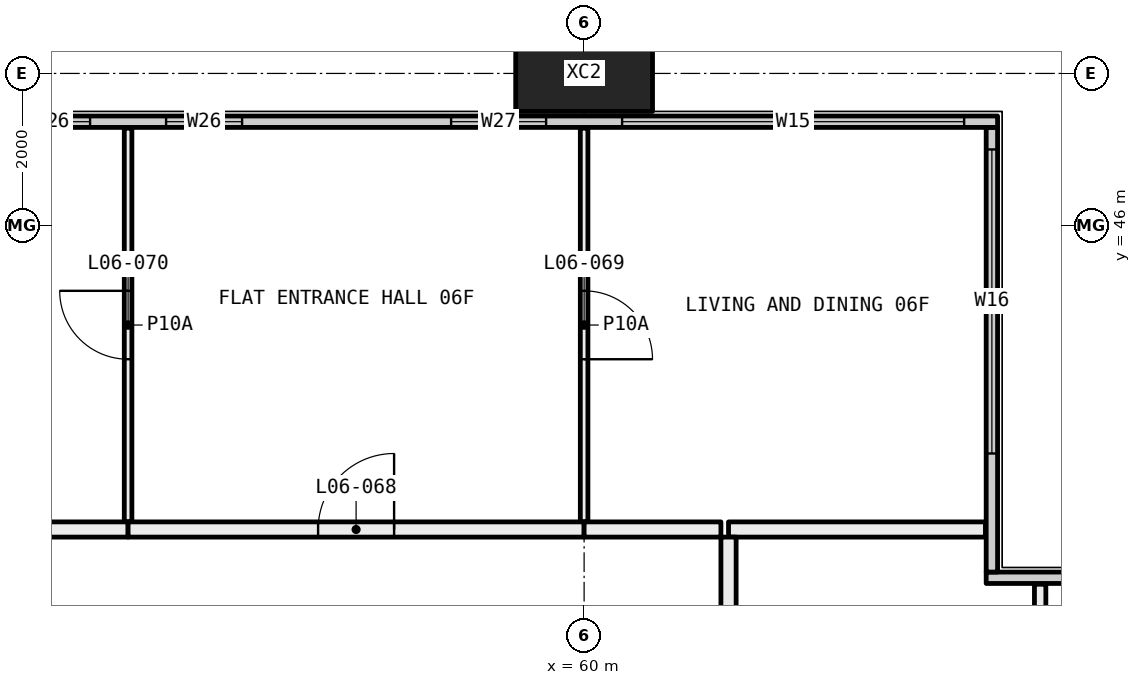
"""IFC4 building model, lengths in metres.
Left out: names, types, materials, properties, quantities, classifications, styles, units other than length and angle.
Written with IfcOpenShell. Run it as: python <this file> out.ifc"""

import sys

from ifc_helpers import new_model, si_unit, direction, frame, frame_2d, origin, origin_2d, place, context, subcontext, project, spatial, rectangle, hollow_rectangle, extrude, element, fill, save


model = new_model("IFC4")
c1 = context("Model", 3, precision=1e-05, world=origin(), true_north=direction((0.0, 1.0)))
c2 = subcontext(c1, "Body", "Model", "MODEL_VIEW")
j1 = project(units=[si_unit("LENGTHUNIT", "METRE"), si_unit("PLANEANGLEUNIT", "RADIAN")], contexts=[c1])
p1 = place(None, origin())
s1 = spatial("IfcSite", under=j1, at=p1, CompositionType="ELEMENT")
p2 = place(p1, origin())
s2 = spatial("IfcBuilding", under=s1, at=p2, CompositionType="ELEMENT")
p3 = place(p2, frame((0.0, 0.0, 33.45)))
s3 = spatial("IfcBuildingStorey", under=s2, at=p3, CompositionType="ELEMENT", Elevation=33.45)
p4 = place(p3, frame((60.0, 48.0, -0.4), z_axis=(0.0, 0.0, 1.0), x_axis=(1.0, 0.0, 0.0)))
e1 = element("IfcColumn", 1, at=p4, inside=s3, PredefinedType="COLUMN", context=c2, shape_type="SweptSolid", body=[
    extrude(hollow_rectangle(XDim=1.8, YDim=1.0, WallThickness=0.07, at=origin_2d()), origin(), (0.0, 0.0, 1.0), 3.45),
])
p5 = place(p3, frame((65.29, 41.365, 0.0), z_axis=(0.0, 0.0, 1.0), x_axis=(1.0, 0.0, 0.0)))
e2 = element("IfcWall", 2, at=p5, inside=s3, PredefinedType="ELEMENTEDWALL", context=c2, shape_type="SweptSolid", body=[
    extrude(rectangle(XDim=6.15, YDim=0.15, at=frame_2d((3.075, 0.0))), origin(), (0.0, 0.0, 1.0), 3.05),
])
p6 = place(p5, frame((1.71, 0.0, 0.45)))
e3 = element("IfcOpeningElement", 3, at=p6, cuts=e2, PredefinedType="OPENING", context=c2, shape_type="SweptSolid", body=[
    extrude(rectangle(XDim=4.0, YDim=2.55, at=frame_2d((2.0, 1.275))), frame((0.0, 0.085, 0.0), z_axis=(0.0, -1.0, 0.0), x_axis=(1.0, 0.0, 0.0)), (0.0, 0.0, 1.0), 0.17),
])
p7 = place(p3, frame((65.365, 41.44, 0.0), z_axis=(0.0, 0.0, 1.0), x_axis=(0.0, 1.0, 0.0)))
e4 = element("IfcWall", 4, at=p7, inside=s3, PredefinedType="ELEMENTEDWALL", context=c2, shape_type="SweptSolid", body=[
    extrude(rectangle(XDim=5.85, YDim=0.15, at=frame_2d((2.925, 0.0))), origin(), (0.0, 0.0, 1.0), 3.05),
])
p8 = place(p7, frame((1.56, 0.0, 0.45)))
e5 = element("IfcOpeningElement", 5, at=p8, cuts=e4, PredefinedType="OPENING", context=c2, shape_type="SweptSolid", body=[
    extrude(rectangle(XDim=4.0, YDim=2.55, at=frame_2d((2.0, 1.275))), frame((0.0, 0.085, 0.0), z_axis=(0.0, -1.0, 0.0), x_axis=(1.0, 0.0, 0.0)), (0.0, 0.0, 1.0), 0.17),
])
p9 = place(p3, frame((6.56, 47.365, 0.0), z_axis=(0.0, 0.0, 1.0), x_axis=(1.0, 0.0, 0.0)))
e6 = element("IfcWall", 6, at=p9, inside=s3, PredefinedType="ELEMENTEDWALL", context=c2, shape_type="SweptSolid", body=[
    extrude(rectangle(XDim=58.88, YDim=0.15, at=frame_2d((29.44, 0.0))), origin(), (0.0, 0.0, 1.0), 3.05),
])
p10 = place(p9, frame((0.44, 0.0, 0.45)))
e7 = element("IfcOpeningElement", 7, at=p10, cuts=e6, PredefinedType="OPENING", context=c2, shape_type="SweptSolid", body=[
    extrude(rectangle(XDim=4.5, YDim=2.55, at=frame_2d((2.25, 1.275))), frame((0.0, 0.085, 0.0), z_axis=(0.0, -1.0, 0.0), x_axis=(1.0, 0.0, 0.0)), (0.0, 0.0, 1.0), 0.17),
])
p11 = place(p9, frame((5.94, 0.0, 0.45)))
e8 = element("IfcOpeningElement", 8, at=p11, cuts=e6, PredefinedType="OPENING", context=c2, shape_type="SweptSolid", body=[
    extrude(rectangle(XDim=1.25, YDim=2.55, at=frame_2d((0.625, 1.275))), frame((0.0, 0.085, 0.0), z_axis=(0.0, -1.0, 0.0), x_axis=(1.0, 0.0, 0.0)), (0.0, 0.0, 1.0), 0.17),
])
p12 = place(p9, frame((9.94, 0.0, 0.45)))
e9 = element("IfcOpeningElement", 9, at=p12, cuts=e6, PredefinedType="OPENING", context=c2, shape_type="SweptSolid", body=[
    extrude(rectangle(XDim=1.0, YDim=2.55, at=frame_2d((0.5, 1.275))), frame((0.0, 0.085, 0.0), z_axis=(0.0, -1.0, 0.0), x_axis=(1.0, 0.0, 0.0)), (0.0, 0.0, 1.0), 0.17),
])
p13 = place(p9, frame((11.94, 0.0, 0.45)))
e10 = element("IfcOpeningElement", 10, at=p13, cuts=e6, PredefinedType="OPENING", context=c2, shape_type="SweptSolid", body=[
    extrude(rectangle(XDim=1.0, YDim=2.55, at=frame_2d((0.5, 1.275))), frame((0.0, 0.085, 0.0), z_axis=(0.0, -1.0, 0.0), x_axis=(1.0, 0.0, 0.0)), (0.0, 0.0, 1.0), 0.17),
])
p14 = place(p9, frame((15.69, 0.0, 0.45)))
e11 = element("IfcOpeningElement", 11, at=p14, cuts=e6, PredefinedType="OPENING", context=c2, shape_type="SweptSolid", body=[
    extrude(rectangle(XDim=1.25, YDim=2.55, at=frame_2d((0.625, 1.275))), frame((0.0, 0.085, 0.0), z_axis=(0.0, -1.0, 0.0), x_axis=(1.0, 0.0, 0.0)), (0.0, 0.0, 1.0), 0.17),
])
p15 = place(p9, frame((17.94, 0.0, 0.45)))
e12 = element("IfcOpeningElement", 12, at=p15, cuts=e6, PredefinedType="OPENING", context=c2, shape_type="SweptSolid", body=[
    extrude(rectangle(XDim=1.25, YDim=2.55, at=frame_2d((0.625, 1.275))), frame((0.0, 0.085, 0.0), z_axis=(0.0, -1.0, 0.0), x_axis=(1.0, 0.0, 0.0)), (0.0, 0.0, 1.0), 0.17),
])
p16 = place(p9, frame((21.94, 0.0, 0.45)))
e13 = element("IfcOpeningElement", 13, at=p16, cuts=e6, PredefinedType="OPENING", context=c2, shape_type="SweptSolid", body=[
    extrude(rectangle(XDim=1.0, YDim=2.55, at=frame_2d((0.5, 1.275))), frame((0.0, 0.085, 0.0), z_axis=(0.0, -1.0, 0.0), x_axis=(1.0, 0.0, 0.0)), (0.0, 0.0, 1.0), 0.17),
])
p17 = place(p9, frame((23.94, 0.0, 0.45)))
e14 = element("IfcOpeningElement", 14, at=p17, cuts=e6, PredefinedType="OPENING", context=c2, shape_type="SweptSolid", body=[
    extrude(rectangle(XDim=1.0, YDim=2.55, at=frame_2d((0.5, 1.275))), frame((0.0, 0.085, 0.0), z_axis=(0.0, -1.0, 0.0), x_axis=(1.0, 0.0, 0.0)), (0.0, 0.0, 1.0), 0.17),
])
p18 = place(p9, frame((27.69, 0.0, 0.45)))
e15 = element("IfcOpeningElement", 15, at=p18, cuts=e6, PredefinedType="OPENING", context=c2, shape_type="SweptSolid", body=[
    extrude(rectangle(XDim=1.25, YDim=2.55, at=frame_2d((0.625, 1.275))), frame((0.0, 0.085, 0.0), z_axis=(0.0, -1.0, 0.0), x_axis=(1.0, 0.0, 0.0)), (0.0, 0.0, 1.0), 0.17),
])
p19 = place(p9, frame((29.94, 0.0, 0.45)))
e16 = element("IfcOpeningElement", 16, at=p19, cuts=e6, PredefinedType="OPENING", context=c2, shape_type="SweptSolid", body=[
    extrude(rectangle(XDim=1.25, YDim=2.55, at=frame_2d((0.625, 1.275))), frame((0.0, 0.085, 0.0), z_axis=(0.0, -1.0, 0.0), x_axis=(1.0, 0.0, 0.0)), (0.0, 0.0, 1.0), 0.17),
])
p20 = place(p9, frame((33.94, 0.0, 0.45)))
e17 = element("IfcOpeningElement", 17, at=p20, cuts=e6, PredefinedType="OPENING", context=c2, shape_type="SweptSolid", body=[
    extrude(rectangle(XDim=1.0, YDim=2.55, at=frame_2d((0.5, 1.275))), frame((0.0, 0.085, 0.0), z_axis=(0.0, -1.0, 0.0), x_axis=(1.0, 0.0, 0.0)), (0.0, 0.0, 1.0), 0.17),
])
p21 = place(p9, frame((35.94, 0.0, 0.45)))
e18 = element("IfcOpeningElement", 18, at=p21, cuts=e6, PredefinedType="OPENING", context=c2, shape_type="SweptSolid", body=[
    extrude(rectangle(XDim=1.0, YDim=2.55, at=frame_2d((0.5, 1.275))), frame((0.0, 0.085, 0.0), z_axis=(0.0, -1.0, 0.0), x_axis=(1.0, 0.0, 0.0)), (0.0, 0.0, 1.0), 0.17),
])
p22 = place(p9, frame((39.69, 0.0, 0.45)))
e19 = element("IfcOpeningElement", 19, at=p22, cuts=e6, PredefinedType="OPENING", context=c2, shape_type="SweptSolid", body=[
    extrude(rectangle(XDim=1.25, YDim=2.55, at=frame_2d((0.625, 1.275))), frame((0.0, 0.085, 0.0), z_axis=(0.0, -1.0, 0.0), x_axis=(1.0, 0.0, 0.0)), (0.0, 0.0, 1.0), 0.17),
])
p23 = place(p9, frame((41.94, 0.0, 0.45)))
e20 = element("IfcOpeningElement", 20, at=p23, cuts=e6, PredefinedType="OPENING", context=c2, shape_type="SweptSolid", body=[
    extrude(rectangle(XDim=1.25, YDim=2.55, at=frame_2d((0.625, 1.275))), frame((0.0, 0.085, 0.0), z_axis=(0.0, -1.0, 0.0), x_axis=(1.0, 0.0, 0.0)), (0.0, 0.0, 1.0), 0.17),
])
p24 = place(p9, frame((45.94, 0.0, 0.45)))
e21 = element("IfcOpeningElement", 21, at=p24, cuts=e6, PredefinedType="OPENING", context=c2, shape_type="SweptSolid", body=[
    extrude(rectangle(XDim=1.0, YDim=2.55, at=frame_2d((0.5, 1.275))), frame((0.0, 0.085, 0.0), z_axis=(0.0, -1.0, 0.0), x_axis=(1.0, 0.0, 0.0)), (0.0, 0.0, 1.0), 0.17),
])
p25 = place(p9, frame((47.94, 0.0, 0.45)))
e22 = element("IfcOpeningElement", 22, at=p25, cuts=e6, PredefinedType="OPENING", context=c2, shape_type="SweptSolid", body=[
    extrude(rectangle(XDim=1.0, YDim=2.55, at=frame_2d((0.5, 1.275))), frame((0.0, 0.085, 0.0), z_axis=(0.0, -1.0, 0.0), x_axis=(1.0, 0.0, 0.0)), (0.0, 0.0, 1.0), 0.17),
])
p26 = place(p9, frame((51.69, 0.0, 0.45)))
e23 = element("IfcOpeningElement", 23, at=p26, cuts=e6, PredefinedType="OPENING", context=c2, shape_type="SweptSolid", body=[
    extrude(rectangle(XDim=1.25, YDim=2.55, at=frame_2d((0.625, 1.275))), frame((0.0, 0.085, 0.0), z_axis=(0.0, -1.0, 0.0), x_axis=(1.0, 0.0, 0.0)), (0.0, 0.0, 1.0), 0.17),
])
p27 = place(p9, frame((53.94, 0.0, 0.45)))
e24 = element("IfcOpeningElement", 24, at=p27, cuts=e6, PredefinedType="OPENING", context=c2, shape_type="SweptSolid", body=[
    extrude(rectangle(XDim=4.5, YDim=2.55, at=frame_2d((2.25, 1.275))), frame((0.0, 0.085, 0.0), z_axis=(0.0, -1.0, 0.0), x_axis=(1.0, 0.0, 0.0)), (0.0, 0.0, 1.0), 0.17),
])
p28 = place(p3, frame((66.0, 41.28, 0.0), z_axis=(0.0, 0.0, 1.0), x_axis=(0.0, -1.0, 0.0)))
e25 = element("IfcWall", 25, at=p28, inside=s3, PredefinedType="PARTITIONING", context=c2, shape_type="SweptSolid", body=[
    extrude(rectangle(XDim=3.78, YDim=0.15, at=frame_2d((1.89, 0.0))), origin(), (0.0, 0.0, 1.0), 3.05),
])
p29 = place(p3, frame((65.28, 42.0, 0.0), z_axis=(0.0, 0.0, 1.0), x_axis=(-1.0, 0.0, 0.0)))
e26 = element("IfcWall", 26, at=p29, inside=s3, PredefinedType="PARTITIONING", context=c2, shape_type="SweptSolid", body=[
    extrude(rectangle(XDim=3.38, YDim=0.2, at=frame_2d((1.69, 0.0))), origin(), (0.0, 0.0, 1.0), 3.05),
])
p30 = place(p3, frame((61.9, 41.9, 0.0), z_axis=(0.0, 0.0, 1.0), x_axis=(0.0, -1.0, 0.0)))
e27 = element("IfcWall", 27, at=p30, inside=s3, PredefinedType="PARTITIONING", context=c2, shape_type="SweptSolid", body=[
    extrude(rectangle(XDim=4.4, YDim=0.2, at=frame_2d((2.2, 0.0))), origin(), (0.0, 0.0, 1.0), 3.05),
])
p31 = place(p3, frame((54.0, 42.1, 0.0), z_axis=(0.0, 0.0, 1.0), x_axis=(0.0, 1.0, 0.0)))
e28 = element("IfcWall", 28, at=p31, inside=s3, PredefinedType="PARTITIONING", context=c2, shape_type="SweptSolid", body=[
    extrude(rectangle(XDim=5.18, YDim=0.1, at=frame_2d((2.59, 0.0))), origin(), (0.0, 0.0, 1.0), 3.05),
])
p32 = place(p31, frame((2.14, 0.0, 0.0)))
e29 = element("IfcOpeningElement", 29, at=p32, cuts=e28, PredefinedType="OPENING", context=c2, shape_type="SweptSolid", body=[
    extrude(rectangle(XDim=0.9, YDim=2.1, at=frame_2d((0.45, 1.05))), frame((0.0, 0.06, 0.0), z_axis=(0.0, -1.0, 0.0), x_axis=(1.0, 0.0, 0.0)), (0.0, 0.0, 1.0), 0.12),
])
p33 = place(p3, frame((48.0, 42.0, 0.0), z_axis=(0.0, 0.0, 1.0), x_axis=(1.0, 0.0, 0.0)))
e30 = element("IfcWall", 30, at=p33, inside=s3, PredefinedType="PARTITIONING", context=c2, shape_type="SweptSolid", body=[
    extrude(rectangle(XDim=6.0, YDim=0.2, at=frame_2d((3.0, 0.0))), origin(), (0.0, 0.0, 1.0), 3.05),
])
p34 = place(p3, frame((60.0, 42.1, 0.0), z_axis=(0.0, 0.0, 1.0), x_axis=(0.0, 1.0, 0.0)))
e31 = element("IfcWall", 31, at=p34, inside=s3, PredefinedType="PARTITIONING", context=c2, shape_type="SweptSolid", body=[
    extrude(rectangle(XDim=5.18, YDim=0.1, at=frame_2d((2.59, 0.0))), origin(), (0.0, 0.0, 1.0), 3.05),
])
p35 = place(p34, frame((2.14, 0.0, 0.0)))
e32 = element("IfcOpeningElement", 32, at=p35, cuts=e31, PredefinedType="OPENING", context=c2, shape_type="SweptSolid", body=[
    extrude(rectangle(XDim=0.9, YDim=2.1, at=frame_2d((0.45, 1.05))), frame((0.0, 0.06, 0.0), z_axis=(0.0, -1.0, 0.0), x_axis=(1.0, 0.0, 0.0)), (0.0, 0.0, 1.0), 0.12),
])
p36 = place(p3, frame((54.0, 42.0, 0.0), z_axis=(0.0, 0.0, 1.0), x_axis=(1.0, 0.0, 0.0)))
e33 = element("IfcWall", 33, at=p36, inside=s3, PredefinedType="PARTITIONING", context=c2, shape_type="SweptSolid", body=[
    extrude(rectangle(XDim=6.0, YDim=0.2, at=frame_2d((3.0, 0.0))), origin(), (0.0, 0.0, 1.0), 3.05),
])
p37 = place(p36, frame((2.5, 0.0, 0.0)))
e34 = element("IfcOpeningElement", 34, at=p37, cuts=e33, PredefinedType="OPENING", context=c2, shape_type="SweptSolid", body=[
    extrude(rectangle(XDim=1.0, YDim=2.1, at=frame_2d((0.5, 1.05))), frame((0.0, 0.11, 0.0), z_axis=(0.0, -1.0, 0.0), x_axis=(1.0, 0.0, 0.0)), (0.0, 0.0, 1.0), 0.22),
])
p38 = place(p3, frame((60.0, 42.0, 0.0), z_axis=(0.0, 0.0, 1.0), x_axis=(1.0, 0.0, 0.0)))
e35 = element("IfcWall", 35, at=p38, inside=s3, PredefinedType="PARTITIONING", context=c2, shape_type="SweptSolid", body=[
    extrude(rectangle(XDim=1.8, YDim=0.2, at=frame_2d((0.9, 0.0))), origin(), (0.0, 0.0, 1.0), 3.05),
])
p39 = place(p8, origin())
e36 = element("IfcWindow", 36, at=p39, inside=s3, PartitioningType="SINGLE_PANEL", PredefinedType="WINDOW", context=c2, shape_type="SweptSolid", body=[
    extrude(rectangle(XDim=4.0, YDim=2.55, at=frame_2d((2.0, 1.275))), frame((0.0, 0.03, 0.0), z_axis=(0.0, -1.0, 0.0), x_axis=(1.0, 0.0, 0.0)), (0.0, 0.0, 1.0), 0.06),
])
fill(e5, e36)
p40 = place(p24, origin())
e37 = element("IfcWindow", 37, at=p40, inside=s3, PartitioningType="SINGLE_PANEL", PredefinedType="WINDOW", context=c2, shape_type="SweptSolid", body=[
    extrude(rectangle(XDim=1.0, YDim=2.55, at=frame_2d((0.5, 1.275))), frame((0.0, 0.03, 0.0), z_axis=(0.0, -1.0, 0.0), x_axis=(1.0, 0.0, 0.0)), (0.0, 0.0, 1.0), 0.06),
])
fill(e21, e37)
p41 = place(p25, origin())
e38 = element("IfcWindow", 38, at=p41, inside=s3, PartitioningType="SINGLE_PANEL", PredefinedType="WINDOW", context=c2, shape_type="SweptSolid", body=[
    extrude(rectangle(XDim=1.0, YDim=2.55, at=frame_2d((0.5, 1.275))), frame((0.0, 0.03, 0.0), z_axis=(0.0, -1.0, 0.0), x_axis=(1.0, 0.0, 0.0)), (0.0, 0.0, 1.0), 0.06),
])
fill(e22, e38)
p42 = place(p26, origin())
e39 = element("IfcWindow", 39, at=p42, inside=s3, PartitioningType="SINGLE_PANEL", PredefinedType="WINDOW", context=c2, shape_type="SweptSolid", body=[
    extrude(rectangle(XDim=1.25, YDim=2.55, at=frame_2d((0.625, 1.275))), frame((0.0, 0.03, 0.0), z_axis=(0.0, -1.0, 0.0), x_axis=(1.0, 0.0, 0.0)), (0.0, 0.0, 1.0), 0.06),
])
fill(e23, e39)
p43 = place(p27, origin())
e40 = element("IfcWindow", 40, at=p43, inside=s3, PartitioningType="SINGLE_PANEL", PredefinedType="WINDOW", context=c2, shape_type="SweptSolid", body=[
    extrude(rectangle(XDim=4.5, YDim=2.55, at=frame_2d((2.25, 1.275))), frame((0.0, 0.03, 0.0), z_axis=(0.0, -1.0, 0.0), x_axis=(1.0, 0.0, 0.0)), (0.0, 0.0, 1.0), 0.06),
])
fill(e24, e40)
p44 = place(p37, origin())
e41 = element("IfcDoor", 41, at=p44, inside=s3, OperationType="SINGLE_SWING_LEFT", PredefinedType="DOOR", context=c2, shape_type="SweptSolid", body=[
    extrude(rectangle(XDim=1.0, YDim=2.1, at=frame_2d((0.5, 1.05))), frame((0.0, 0.025, 0.0), z_axis=(0.0, -1.0, 0.0), x_axis=(1.0, 0.0, 0.0)), (0.0, 0.0, 1.0), 0.05),
])
fill(e34, e41)
p45 = place(p35, frame((0.9, 0.0, 0.0), x_axis=(-1.0, 0.0, 0.0)))
e42 = element("IfcDoor", 42, at=p45, inside=s3, OperationType="SINGLE_SWING_LEFT", PredefinedType="DOOR", context=c2, shape_type="SweptSolid", body=[
    extrude(rectangle(XDim=0.9, YDim=2.1, at=frame_2d((0.45, 1.05))), frame((0.0, 0.025, 0.0), z_axis=(0.0, -1.0, 0.0), x_axis=(1.0, 0.0, 0.0)), (0.0, 0.0, 1.0), 0.05),
])
fill(e32, e42)
p46 = place(p32, origin())
e43 = element("IfcDoor", 43, at=p46, inside=s3, OperationType="SINGLE_SWING_LEFT", PredefinedType="DOOR", context=c2, shape_type="SweptSolid", body=[
    extrude(rectangle(XDim=0.9, YDim=2.1, at=frame_2d((0.45, 1.05))), frame((0.0, 0.025, 0.0), z_axis=(0.0, -1.0, 0.0), x_axis=(1.0, 0.0, 0.0)), (0.0, 0.0, 1.0), 0.05),
])
fill(e29, e43)
save(model, sys.argv[1])
